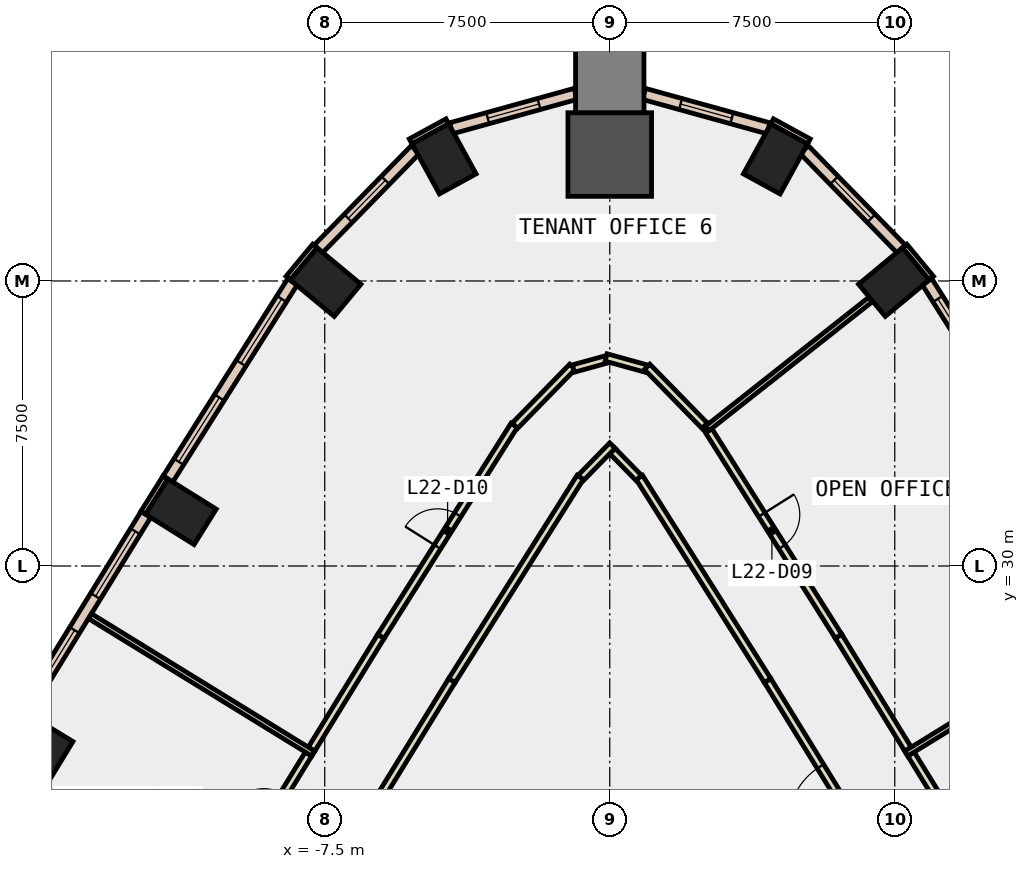
"""IFC4 building model, lengths in metres.
Left out: names, types, materials, properties, quantities, classifications, styles, units other than length and angle.
Written with IfcOpenShell. Run it as: python <this file> out.ifc"""

import sys

from ifc_helpers import new_model, si_unit, direction, frame, frame_2d, origin, origin_2d, place, context, subcontext, project, spatial, rectangle, extrude, element, fill, save


model = new_model("IFC4")
c1 = context("Model", 3, precision=1e-05, world=origin(), true_north=direction((0.0, 1.0)))
c2 = subcontext(c1, "Body", "Model", "MODEL_VIEW")
j1 = project(units=[si_unit("LENGTHUNIT", "METRE"), si_unit("PLANEANGLEUNIT", "RADIAN")], contexts=[c1])
p1 = place(None, origin())
s1 = spatial("IfcSite", under=j1, at=p1, CompositionType="ELEMENT")
p2 = place(p1, origin())
s2 = spatial("IfcBuilding", under=s1, at=p2, CompositionType="ELEMENT")
p3 = place(p2, frame((0.0, 0.0, 103.4)))
s3 = spatial("IfcBuildingStorey", under=s2, at=p3, CompositionType="ELEMENT", Elevation=103.4)
for number, where, z_axis, x_axis in (
    (1, (7.476, 37.47, -0.4), (0.0, 0.0, 1.0), (-0.638, 0.77, 0.0)),
    (2, (4.36, 40.712, -0.4), (0.0, 0.0, 1.0), (-0.877, 0.48, 0.0)),
):
    element("IfcColumn", number, at=place(p3, frame(where, z_axis=z_axis, x_axis=x_axis)), inside=s3, PredefinedType="COLUMN", context=c2, shape_type="SweptSolid", body=[
        extrude(rectangle(XDim=1.1, YDim=1.5, at=origin_2d()), origin(), (0.0, 0.0, 1.0), 4.2),
    ])
p4 = place(p3, frame((0.0, 40.827, -0.4), z_axis=(0.0, 0.0, 1.0), x_axis=(0.0, 1.0, 0.0)))
e3 = element("IfcColumn", 3, at=p4, inside=s3, PredefinedType="COLUMN", context=c2, shape_type="SweptSolid", body=[
    extrude(rectangle(XDim=2.2, YDim=2.2, at=origin_2d()), origin(), (0.0, 0.0, 1.0), 4.2),
])
for number, where, z_axis, x_axis in (
    (4, (-4.36, 40.712, -0.4), (0.0, 0.0, 1.0), (0.877, 0.48, 0.0)),
    (5, (-7.476, 37.47, -0.4), (0.0, 0.0, 1.0), (0.638, 0.77, 0.0)),
    (6, (-11.283, 31.428, -0.4), (0.0, 0.0, 1.0), (0.53, 0.848, 0.0)),
    (7, (-15.053, 25.302, -0.4), (0.0, 0.0, 1.0), (0.52, 0.854, 0.0)),
):
    element("IfcColumn", number, at=place(p3, frame(where, z_axis=z_axis, x_axis=x_axis)), inside=s3, PredefinedType="COLUMN", context=c2, shape_type="SweptSolid", body=[
        extrude(rectangle(XDim=1.1, YDim=1.5, at=origin_2d()), origin(), (0.0, 0.0, 1.0), 4.2),
    ])
p5 = place(p3, frame((0.0, 42.827, -0.4), z_axis=(0.0, 0.0, 1.0), x_axis=(0.0, 1.0, 0.0)))
e8 = element("IfcColumn", 8, at=p5, inside=s3, PredefinedType="COLUMN", context=c2, shape_type="SweptSolid", body=[
    extrude(rectangle(XDim=1.8, YDim=1.8, at=origin_2d()), origin(), (0.0, 0.0, 1.0), 4.2),
])
for number, where, z_axis, x_axis in (
    (9, (5.239, 41.172, 0.0), (0.0, 0.0, 1.0), (-0.878, 0.479, 0.0)),
    (10, (-4.273, 41.7, 0.0), (0.0, 0.0, 1.0), (-0.878, -0.479, 0.0)),
):
    element("IfcWall", number, at=place(p3, frame(where, z_axis=z_axis, x_axis=x_axis)), inside=s3, PredefinedType="STANDARD", context=c2, shape_type="SweptSolid", body=[
        extrude(rectangle(XDim=1.101, YDim=0.15, at=frame_2d((0.55, 0.0))), origin(), (0.0, 0.0, 1.0), 3.8),
    ])
for number, where, z_axis, x_axis in (
    (11, (8.462, 37.574, 0.0), (0.0, 0.0, 1.0), (-0.639, 0.77, 0.0)),
    (12, (-7.76, 38.42, 0.0), (0.0, 0.0, 1.0), (-0.639, -0.77, 0.0)),
):
    element("IfcWall", number, at=place(p3, frame(where, z_axis=z_axis, x_axis=x_axis)), inside=s3, PredefinedType="STANDARD", context=c2, shape_type="SweptSolid", body=[
        extrude(rectangle(XDim=1.099, YDim=0.15, at=frame_2d((0.55, 0.0))), origin(), (0.0, 0.0, 1.0), 3.8),
    ])
p6 = place(p3, frame((-11.691, 32.332, 0.0), z_axis=(0.0, 0.0, 1.0), x_axis=(-0.529879262372, -0.848073090782, 0.0)))
e13 = element("IfcWall", 13, at=p6, inside=s3, PredefinedType="STANDARD", context=c2, shape_type="SweptSolid", body=[
    extrude(rectangle(XDim=1.1, YDim=0.15, at=frame_2d((0.55, 0.0))), origin(), (0.0, 0.0, 1.0), 3.8),
])
p7 = place(p3, frame((11.626, 32.29, 0.0), z_axis=(0.0, 0.0, 1.0), x_axis=(-0.534018429465, 0.845472836342, 0.0)))
e14 = element("IfcWall", 14, at=p7, inside=s3, PredefinedType="STANDARD", context=c2, shape_type="SweptSolid", body=[
    extrude(rectangle(XDim=6.138, YDim=0.3, at=frame_2d((3.069, 0.0))), origin(), (0.0, 0.0, 1.0), 3.8),
])
p8 = place(p7, frame((0.535, 0.0, 0.9)))
e15 = element("IfcOpeningElement", 15, at=p8, cuts=e14, PredefinedType="OPENING", context=c2, shape_type="SweptSolid", body=[
    extrude(rectangle(XDim=2.0, YDim=2.6, at=frame_2d((1.0, 1.3))), frame((0.0, 0.16, 0.0), z_axis=(0.0, -1.0, 0.0), x_axis=(1.0, 0.0, 0.0)), (0.0, 0.0, 1.0), 0.32),
])
p9 = place(p7, frame((3.604, 0.0, 0.9)))
e16 = element("IfcOpeningElement", 16, at=p9, cuts=e14, PredefinedType="OPENING", context=c2, shape_type="SweptSolid", body=[
    extrude(rectangle(XDim=2.0, YDim=2.6, at=frame_2d((1.0, 1.3))), frame((0.0, 0.16, 0.0), z_axis=(0.0, -1.0, 0.0), x_axis=(1.0, 0.0, 0.0)), (0.0, 0.0, 1.0), 0.32),
])
p10 = place(p3, frame((7.668, 38.343, 0.0), z_axis=(0.0, 0.0, 1.0), x_axis=(-0.698695735804, 0.715418946331, 0.0)))
e17 = element("IfcWall", 17, at=p10, inside=s3, PredefinedType="STANDARD", context=c2, shape_type="SweptSolid", body=[
    extrude(rectangle(XDim=3.65, YDim=0.3, at=frame_2d((1.825, 0.0))), origin(), (0.0, 0.0, 1.0), 3.8),
])
p11 = place(p10, frame((1.125, 0.0, 0.9)))
e18 = element("IfcOpeningElement", 18, at=p11, cuts=e17, PredefinedType="OPENING", context=c2, shape_type="SweptSolid", body=[
    extrude(rectangle(XDim=1.4, YDim=2.6, at=frame_2d((0.7, 1.3))), frame((0.0, 0.16, 0.0), z_axis=(0.0, -1.0, 0.0), x_axis=(1.0, 0.0, 0.0)), (0.0, 0.0, 1.0), 0.32),
])
p12 = place(p3, frame((4.175, 41.517, 0.0), z_axis=(0.0, 0.0, 1.0), x_axis=(-0.963822898894, 0.266543466562, 0.0)))
e19 = element("IfcWall", 19, at=p12, inside=s3, PredefinedType="STANDARD", context=c2, shape_type="SweptSolid", body=[
    extrude(rectangle(XDim=3.399, YDim=0.3, at=frame_2d((1.7, 0.0))), origin(), (0.0, 0.0, 1.0), 3.8),
])
p13 = place(p12, frame((0.999, 0.0, 0.9)))
e20 = element("IfcOpeningElement", 20, at=p13, cuts=e19, PredefinedType="OPENING", context=c2, shape_type="SweptSolid", body=[
    extrude(rectangle(XDim=1.4, YDim=2.6, at=frame_2d((0.7, 1.3))), frame((0.0, 0.16, 0.0), z_axis=(0.0, -1.0, 0.0), x_axis=(1.0, 0.0, 0.0)), (0.0, 0.0, 1.0), 0.32),
])
p14 = place(p3, frame((-0.899, 42.423, 0.0), z_axis=(0.0, 0.0, 1.0), x_axis=(-0.963822898894, -0.266543466562, 0.0)))
e21 = element("IfcWall", 21, at=p14, inside=s3, PredefinedType="STANDARD", context=c2, shape_type="SweptSolid", body=[
    extrude(rectangle(XDim=3.399, YDim=0.3, at=frame_2d((1.7, 0.0))), origin(), (0.0, 0.0, 1.0), 3.8),
])
p15 = place(p14, frame((0.999, 0.0, 0.9)))
e22 = element("IfcOpeningElement", 22, at=p15, cuts=e21, PredefinedType="OPENING", context=c2, shape_type="SweptSolid", body=[
    extrude(rectangle(XDim=1.4, YDim=2.6, at=frame_2d((0.7, 1.3))), frame((0.0, 0.16, 0.0), z_axis=(0.0, -1.0, 0.0), x_axis=(1.0, 0.0, 0.0)), (0.0, 0.0, 1.0), 0.32),
])
p16 = place(p3, frame((-5.118, 40.954, 0.0), z_axis=(0.0, 0.0, 1.0), x_axis=(-0.698695735804, -0.715418946331, 0.0)))
e23 = element("IfcWall", 23, at=p16, inside=s3, PredefinedType="STANDARD", context=c2, shape_type="SweptSolid", body=[
    extrude(rectangle(XDim=3.65, YDim=0.3, at=frame_2d((1.825, 0.0))), origin(), (0.0, 0.0, 1.0), 3.8),
])
p17 = place(p16, frame((1.125, 0.0, 0.9)))
e24 = element("IfcOpeningElement", 24, at=p17, cuts=e23, PredefinedType="OPENING", context=c2, shape_type="SweptSolid", body=[
    extrude(rectangle(XDim=1.4, YDim=2.6, at=frame_2d((0.7, 1.3))), frame((0.0, 0.16, 0.0), z_axis=(0.0, -1.0, 0.0), x_axis=(1.0, 0.0, 0.0)), (0.0, 0.0, 1.0), 0.32),
])
p18 = place(p3, frame((-8.348, 37.48, 0.0), z_axis=(0.0, 0.0, 1.0), x_axis=(-0.534018429465, -0.845472836342, 0.0)))
e25 = element("IfcWall", 25, at=p18, inside=s3, PredefinedType="STANDARD", context=c2, shape_type="SweptSolid", body=[
    extrude(rectangle(XDim=6.138, YDim=0.3, at=frame_2d((3.069, 0.0))), origin(), (0.0, 0.0, 1.0), 3.8),
])
p19 = place(p18, frame((0.535, 0.0, 0.9)))
e26 = element("IfcOpeningElement", 26, at=p19, cuts=e25, PredefinedType="OPENING", context=c2, shape_type="SweptSolid", body=[
    extrude(rectangle(XDim=2.0, YDim=2.6, at=frame_2d((1.0, 1.3))), frame((0.0, 0.16, 0.0), z_axis=(0.0, -1.0, 0.0), x_axis=(1.0, 0.0, 0.0)), (0.0, 0.0, 1.0), 0.32),
])
p20 = place(p18, frame((3.604, 0.0, 0.9)))
e27 = element("IfcOpeningElement", 27, at=p20, cuts=e25, PredefinedType="OPENING", context=c2, shape_type="SweptSolid", body=[
    extrude(rectangle(XDim=2.0, YDim=2.6, at=frame_2d((1.0, 1.3))), frame((0.0, 0.16, 0.0), z_axis=(0.0, -1.0, 0.0), x_axis=(1.0, 0.0, 0.0)), (0.0, 0.0, 1.0), 0.32),
])
p21 = place(p3, frame((-12.207, 31.358, 0.0), z_axis=(0.0, 0.0, 1.0), x_axis=(-0.524121974895, -0.851643208998, 0.0)))
e28 = element("IfcWall", 28, at=p21, inside=s3, PredefinedType="STANDARD", context=c2, shape_type="SweptSolid", body=[
    extrude(rectangle(XDim=6.104, YDim=0.3, at=frame_2d((3.052, 0.0))), origin(), (0.0, 0.0, 1.0), 3.8),
])
p22 = place(p21, frame((0.526, 0.0, 0.9)))
e29 = element("IfcOpeningElement", 29, at=p22, cuts=e28, PredefinedType="OPENING", context=c2, shape_type="SweptSolid", body=[
    extrude(rectangle(XDim=2.0, YDim=2.6, at=frame_2d((1.0, 1.3))), frame((0.0, 0.16, 0.0), z_axis=(0.0, -1.0, 0.0), x_axis=(1.0, 0.0, 0.0)), (0.0, 0.0, 1.0), 0.32),
])
p23 = place(p21, frame((3.578, 0.0, 0.9)))
e30 = element("IfcOpeningElement", 30, at=p23, cuts=e28, PredefinedType="OPENING", context=c2, shape_type="SweptSolid", body=[
    extrude(rectangle(XDim=2.0, YDim=2.6, at=frame_2d((1.0, 1.3))), frame((0.0, 0.16, 0.0), z_axis=(0.0, -1.0, 0.0), x_axis=(1.0, 0.0, 0.0)), (0.0, 0.0, 1.0), 0.32),
])
p24 = place(p3, frame((7.875, 20.94, 0.0), z_axis=(0.0, 0.0, 1.0), x_axis=(-0.524183774504, 0.851605172921, 0.0)))
e31 = element("IfcWall", 31, at=p24, inside=s3, PredefinedType="PARTITIONING", context=c2, shape_type="SweptSolid", body=[
    extrude(rectangle(XDim=7.099, YDim=0.2, at=frame_2d((3.549, 0.0))), origin(), (0.0, 0.0, 1.0), 3.8),
])
p25 = place(p24, frame((2.649, 0.0, 0.0)))
e32 = element("IfcOpeningElement", 32, at=p25, cuts=e31, PredefinedType="OPENING", context=c2, shape_type="SweptSolid", body=[
    extrude(rectangle(XDim=1.8, YDim=2.1, at=frame_2d((0.9, 1.05))), frame((0.0, 0.11, 0.0), z_axis=(0.0, -1.0, 0.0), x_axis=(1.0, 0.0, 0.0)), (0.0, 0.0, 1.0), 0.22),
])
p26 = place(p3, frame((4.154, 26.985, 0.0), z_axis=(0.0, 0.0, 1.0), x_axis=(-0.53384777413, 0.84558060175, 0.0)))
e33 = element("IfcWall", 33, at=p26, inside=s3, PredefinedType="PARTITIONING", context=c2, shape_type="SweptSolid", body=[
    extrude(rectangle(XDim=6.326, YDim=0.2, at=frame_2d((3.163, 0.0))), origin(), (0.0, 0.0, 1.0), 3.8),
])
p27 = place(p3, frame((0.76, 32.321, 0.0), z_axis=(0.0, 0.0, 1.0), x_axis=(-0.698898447714, 0.715220916769, 0.0)))
e34 = element("IfcWall", 34, at=p27, inside=s3, PredefinedType="PARTITIONING", context=c2, shape_type="SweptSolid", body=[
    extrude(rectangle(XDim=0.987, YDim=0.2, at=frame_2d((0.494, 0.0))), origin(), (0.0, 0.0, 1.0), 3.8),
])
p28 = place(p3, frame((0.07, 33.17, 0.0), z_axis=(0.0, 0.0, 1.0), x_axis=(-0.699145664909, -0.714979257908, 0.0)))
e35 = element("IfcWall", 35, at=p28, inside=s3, PredefinedType="PARTITIONING", context=c2, shape_type="SweptSolid", body=[
    extrude(rectangle(XDim=1.187, YDim=0.2, at=frame_2d((0.594, 0.0))), origin(), (0.0, 0.0, 1.0), 3.8),
])
p29 = place(p3, frame((-0.777, 32.334, 0.0), z_axis=(0.0, 0.0, 1.0), x_axis=(-0.53384777413, -0.84558060175, 0.0)))
e36 = element("IfcWall", 36, at=p29, inside=s3, PredefinedType="PARTITIONING", context=c2, shape_type="SweptSolid", body=[
    extrude(rectangle(XDim=6.326, YDim=0.2, at=frame_2d((3.163, 0.0))), origin(), (0.0, 0.0, 1.0), 3.8),
])
p30 = place(p3, frame((-4.154, 26.985, 0.0), z_axis=(0.0, 0.0, 1.0), x_axis=(-0.524183774504, -0.851605172921, 0.0)))
e37 = element("IfcWall", 37, at=p30, inside=s3, PredefinedType="PARTITIONING", context=c2, shape_type="SweptSolid", body=[
    extrude(rectangle(XDim=7.099, YDim=0.2, at=frame_2d((3.549, 0.0))), origin(), (0.0, 0.0, 1.0), 3.8),
])
p31 = place(p3, frame((7.927, 25.052, 0.0), z_axis=(0.0, 0.0, 1.0), x_axis=(0.524140390501, -0.851631875311, 0.0)))
e38 = element("IfcWall", 38, at=p31, inside=s3, PredefinedType="PARTITIONING", context=c2, shape_type="SweptSolid", body=[
    extrude(rectangle(XDim=3.487, YDim=0.2, at=frame_2d((1.744, 0.0))), origin(), (0.0, 0.0, 1.0), 3.8),
])
p32 = place(p3, frame((2.513, 33.705, 0.0), z_axis=(0.0, 0.0, 1.0), x_axis=(0.533874165031, -0.845563939577, 0.0)))
e39 = element("IfcWall", 39, at=p32, inside=s3, PredefinedType="PARTITIONING", context=c2, shape_type="SweptSolid", body=[
    extrude(rectangle(XDim=6.571, YDim=0.2, at=frame_2d((3.286, 0.0))), origin(), (0.0, 0.0, 1.0), 3.8),
])
p33 = place(p32, frame((2.785, 0.0, 0.0)))
e40 = element("IfcOpeningElement", 40, at=p33, cuts=e39, PredefinedType="OPENING", context=c2, shape_type="SweptSolid", body=[
    extrude(rectangle(XDim=1.0, YDim=2.1, at=frame_2d((0.5, 1.05))), frame((0.0, 0.11, 0.0), z_axis=(0.0, -1.0, 0.0), x_axis=(1.0, 0.0, 0.0)), (0.0, 0.0, 1.0), 0.22),
])
for number, where, z_axis, x_axis in (
    (41, (6.021, 28.149, 0.0), (0.0, 0.0, 1.0), (0.524, -0.852, 0.0)),
    (42, (-7.848, 25.18, 0.0), (0.0, 0.0, 1.0), (0.524, 0.852, 0.0)),
):
    element("IfcWall", number, at=place(p3, frame(where, z_axis=z_axis, x_axis=x_axis)), inside=s3, PredefinedType="PARTITIONING", context=c2, shape_type="SweptSolid", body=[
        extrude(rectangle(XDim=3.486, YDim=0.2, at=frame_2d((1.743, 0.0))), origin(), (0.0, 0.0, 1.0), 3.8),
    ])
p34 = place(p3, frame((-6.021, 28.149, 0.0), z_axis=(0.0, 0.0, 1.0), x_axis=(0.533874165031, 0.845563939577, 0.0)))
e43 = element("IfcWall", 43, at=p34, inside=s3, PredefinedType="PARTITIONING", context=c2, shape_type="SweptSolid", body=[
    extrude(rectangle(XDim=6.571, YDim=0.2, at=frame_2d((3.286, 0.0))), origin(), (0.0, 0.0, 1.0), 3.8),
])
p35 = place(p34, frame((2.785, 0.0, 0.0)))
e44 = element("IfcOpeningElement", 44, at=p35, cuts=e43, PredefinedType="OPENING", context=c2, shape_type="SweptSolid", body=[
    extrude(rectangle(XDim=1.0, YDim=2.1, at=frame_2d((0.5, 1.05))), frame((0.0, 0.11, 0.0), z_axis=(0.0, -1.0, 0.0), x_axis=(1.0, 0.0, 0.0)), (0.0, 0.0, 1.0), 0.22),
])
p36 = place(p3, frame((-2.496, 33.692, 0.0), z_axis=(0.0, 0.0, 1.0), x_axis=(0.698771726105, 0.715344724449, 0.0)))
e45 = element("IfcWall", 45, at=p36, inside=s3, PredefinedType="PARTITIONING", context=c2, shape_type="SweptSolid", body=[
    extrude(rectangle(XDim=2.166, YDim=0.2, at=frame_2d((1.083, 0.0))), origin(), (0.0, 0.0, 1.0), 3.8),
])
p37 = place(p3, frame((-0.956, 35.196, 0.0), z_axis=(0.0, 0.0, 1.0), x_axis=(0.963772226389, 0.266726630919, 0.0)))
e46 = element("IfcWall", 46, at=p37, inside=s3, PredefinedType="PARTITIONING", context=c2, shape_type="SweptSolid", body=[
    extrude(rectangle(XDim=0.892, YDim=0.2, at=frame_2d((0.446, 0.0))), origin(), (0.0, 0.0, 1.0), 3.8),
])
p38 = place(p3, frame((-0.096, 35.487, 0.0), z_axis=(0.0, 0.0, 1.0), x_axis=(0.963802560401, -0.266616999767, 0.0)))
e47 = element("IfcWall", 47, at=p38, inside=s3, PredefinedType="PARTITIONING", context=c2, shape_type="SweptSolid", body=[
    extrude(rectangle(XDim=1.092, YDim=0.2, at=frame_2d((0.546, 0.0))), origin(), (0.0, 0.0, 1.0), 3.8),
])
p39 = place(p3, frame((0.983, 35.241, 0.0), z_axis=(0.0, 0.0, 1.0), x_axis=(0.698771726105, -0.715344724449, 0.0)))
e48 = element("IfcWall", 48, at=p39, inside=s3, PredefinedType="PARTITIONING", context=c2, shape_type="SweptSolid", body=[
    extrude(rectangle(XDim=2.166, YDim=0.2, at=frame_2d((1.083, 0.0))), origin(), (0.0, 0.0, 1.0), 3.8),
])
p40 = place(p3, frame((-9.755, 22.082, 0.0), z_axis=(0.0, 0.0, 1.0), x_axis=(0.524140390501, 0.851631875311, 0.0)))
e49 = element("IfcWall", 49, at=p40, inside=s3, PredefinedType="PARTITIONING", context=c2, shape_type="SweptSolid", body=[
    extrude(rectangle(XDim=3.487, YDim=0.2, at=frame_2d((1.744, 0.0))), origin(), (0.0, 0.0, 1.0), 3.8),
])
p41 = place(p40, frame((1.244, 0.0, 0.0)))
e50 = element("IfcOpeningElement", 50, at=p41, cuts=e49, PredefinedType="OPENING", context=c2, shape_type="SweptSolid", body=[
    extrude(rectangle(XDim=1.0, YDim=2.1, at=frame_2d((0.5, 1.05))), frame((0.0, 0.11, 0.0), z_axis=(0.0, -1.0, 0.0), x_axis=(1.0, 0.0, 0.0)), (0.0, 0.0, 1.0), 0.22),
])
p42 = place(p3, frame((7.802, 25.064, 0.0), z_axis=(0.0, 0.0, 1.0), x_axis=(0.851596352662, 0.524198103901, 0.0)))
e51 = element("IfcWall", 51, at=p42, inside=s3, PredefinedType="PARTITIONING", context=c2, shape_type="SweptSolid", body=[
    extrude(rectangle(XDim=6.9, YDim=0.15, at=frame_2d((3.45, 0.0))), origin(), (0.0, 0.0, 1.0), 3.8),
])
p43 = place(p3, frame((2.566, 33.62, 0.0), z_axis=(0.0, 0.0, 1.0), x_axis=(0.784838195876, 0.619700739304, 0.0)))
e52 = element("IfcWall", 52, at=p43, inside=s3, PredefinedType="PARTITIONING", context=c2, shape_type="SweptSolid", body=[
    extrude(rectangle(XDim=5.469, YDim=0.15, at=frame_2d((2.734, 0.0))), origin(), (0.0, 0.0, 1.0), 3.8),
])
p44 = place(p3, frame((-7.802, 25.064, 0.0), z_axis=(0.0, 0.0, 1.0), x_axis=(-0.851596352662, 0.524198103901, 0.0)))
e53 = element("IfcWall", 53, at=p44, inside=s3, PredefinedType="PARTITIONING", context=c2, shape_type="SweptSolid", body=[
    extrude(rectangle(XDim=6.9, YDim=0.15, at=frame_2d((3.45, 0.0))), origin(), (0.0, 0.0, 1.0), 3.8),
])
p45 = place(p9, origin())
e54 = element("IfcWindow", 54, at=p45, inside=s3, PartitioningType="SINGLE_PANEL", PredefinedType="WINDOW", context=c2, shape_type="SweptSolid", body=[
    extrude(rectangle(XDim=2.0, YDim=2.6, at=frame_2d((1.0, 1.3))), frame((0.0, 0.03, 0.0), z_axis=(0.0, -1.0, 0.0), x_axis=(1.0, 0.0, 0.0)), (0.0, 0.0, 1.0), 0.06),
])
fill(e16, e54)
p46 = place(p11, origin())
e55 = element("IfcWindow", 55, at=p46, inside=s3, PartitioningType="SINGLE_PANEL", PredefinedType="WINDOW", context=c2, shape_type="SweptSolid", body=[
    extrude(rectangle(XDim=1.4, YDim=2.6, at=frame_2d((0.7, 1.3))), frame((0.0, 0.03, 0.0), z_axis=(0.0, -1.0, 0.0), x_axis=(1.0, 0.0, 0.0)), (0.0, 0.0, 1.0), 0.06),
])
fill(e18, e55)
p47 = place(p13, origin())
e56 = element("IfcWindow", 56, at=p47, inside=s3, PartitioningType="SINGLE_PANEL", PredefinedType="WINDOW", context=c2, shape_type="SweptSolid", body=[
    extrude(rectangle(XDim=1.4, YDim=2.6, at=frame_2d((0.7, 1.3))), frame((0.0, 0.03, 0.0), z_axis=(0.0, -1.0, 0.0), x_axis=(1.0, 0.0, 0.0)), (0.0, 0.0, 1.0), 0.06),
])
fill(e20, e56)
p48 = place(p15, origin())
e57 = element("IfcWindow", 57, at=p48, inside=s3, PartitioningType="SINGLE_PANEL", PredefinedType="WINDOW", context=c2, shape_type="SweptSolid", body=[
    extrude(rectangle(XDim=1.4, YDim=2.6, at=frame_2d((0.7, 1.3))), frame((0.0, 0.03, 0.0), z_axis=(0.0, -1.0, 0.0), x_axis=(1.0, 0.0, 0.0)), (0.0, 0.0, 1.0), 0.06),
])
fill(e22, e57)
p49 = place(p17, origin())
e58 = element("IfcWindow", 58, at=p49, inside=s3, PartitioningType="SINGLE_PANEL", PredefinedType="WINDOW", context=c2, shape_type="SweptSolid", body=[
    extrude(rectangle(XDim=1.4, YDim=2.6, at=frame_2d((0.7, 1.3))), frame((0.0, 0.03, 0.0), z_axis=(0.0, -1.0, 0.0), x_axis=(1.0, 0.0, 0.0)), (0.0, 0.0, 1.0), 0.06),
])
fill(e24, e58)
p50 = place(p19, origin())
e59 = element("IfcWindow", 59, at=p50, inside=s3, PartitioningType="SINGLE_PANEL", PredefinedType="WINDOW", context=c2, shape_type="SweptSolid", body=[
    extrude(rectangle(XDim=2.0, YDim=2.6, at=frame_2d((1.0, 1.3))), frame((0.0, 0.03, 0.0), z_axis=(0.0, -1.0, 0.0), x_axis=(1.0, 0.0, 0.0)), (0.0, 0.0, 1.0), 0.06),
])
fill(e26, e59)
p51 = place(p20, origin())
e60 = element("IfcWindow", 60, at=p51, inside=s3, PartitioningType="SINGLE_PANEL", PredefinedType="WINDOW", context=c2, shape_type="SweptSolid", body=[
    extrude(rectangle(XDim=2.0, YDim=2.6, at=frame_2d((1.0, 1.3))), frame((0.0, 0.03, 0.0), z_axis=(0.0, -1.0, 0.0), x_axis=(1.0, 0.0, 0.0)), (0.0, 0.0, 1.0), 0.06),
])
fill(e27, e60)
p52 = place(p22, origin())
e61 = element("IfcWindow", 61, at=p52, inside=s3, PartitioningType="SINGLE_PANEL", PredefinedType="WINDOW", context=c2, shape_type="SweptSolid", body=[
    extrude(rectangle(XDim=2.0, YDim=2.6, at=frame_2d((1.0, 1.3))), frame((0.0, 0.03, 0.0), z_axis=(0.0, -1.0, 0.0), x_axis=(1.0, 0.0, 0.0)), (0.0, 0.0, 1.0), 0.06),
])
fill(e29, e61)
p53 = place(p23, origin())
e62 = element("IfcWindow", 62, at=p53, inside=s3, PartitioningType="SINGLE_PANEL", PredefinedType="WINDOW", context=c2, shape_type="SweptSolid", body=[
    extrude(rectangle(XDim=2.0, YDim=2.6, at=frame_2d((1.0, 1.3))), frame((0.0, 0.03, 0.0), z_axis=(0.0, -1.0, 0.0), x_axis=(1.0, 0.0, 0.0)), (0.0, 0.0, 1.0), 0.06),
])
fill(e30, e62)
p54 = place(p33, origin())
e63 = element("IfcDoor", 63, at=p54, inside=s3, OperationType="SINGLE_SWING_LEFT", PredefinedType="DOOR", context=c2, shape_type="SweptSolid", body=[
    extrude(rectangle(XDim=1.0, YDim=2.1, at=frame_2d((0.5, 1.05))), frame((0.0, 0.025, 0.0), z_axis=(0.0, -1.0, 0.0), x_axis=(1.0, 0.0, 0.0)), (0.0, 0.0, 1.0), 0.05),
])
fill(e40, e63)
p55 = place(p35, origin())
e64 = element("IfcDoor", 64, at=p55, inside=s3, OperationType="SINGLE_SWING_LEFT", PredefinedType="DOOR", context=c2, shape_type="SweptSolid", body=[
    extrude(rectangle(XDim=1.0, YDim=2.1, at=frame_2d((0.5, 1.05))), frame((0.0, 0.025, 0.0), z_axis=(0.0, -1.0, 0.0), x_axis=(1.0, 0.0, 0.0)), (0.0, 0.0, 1.0), 0.05),
])
fill(e44, e64)
p56 = place(p25, origin())
e65 = element("IfcDoor", 65, at=p56, inside=s3, OperationType="DOUBLE_DOOR_SINGLE_SWING", PredefinedType="DOOR", context=c2, shape_type="SweptSolid", body=[
    extrude(rectangle(XDim=1.8, YDim=2.1, at=frame_2d((0.9, 1.05))), frame((0.0, 0.025, 0.0), z_axis=(0.0, -1.0, 0.0), x_axis=(1.0, 0.0, 0.0)), (0.0, 0.0, 1.0), 0.05),
])
fill(e32, e65)
save(model, sys.argv[1])
